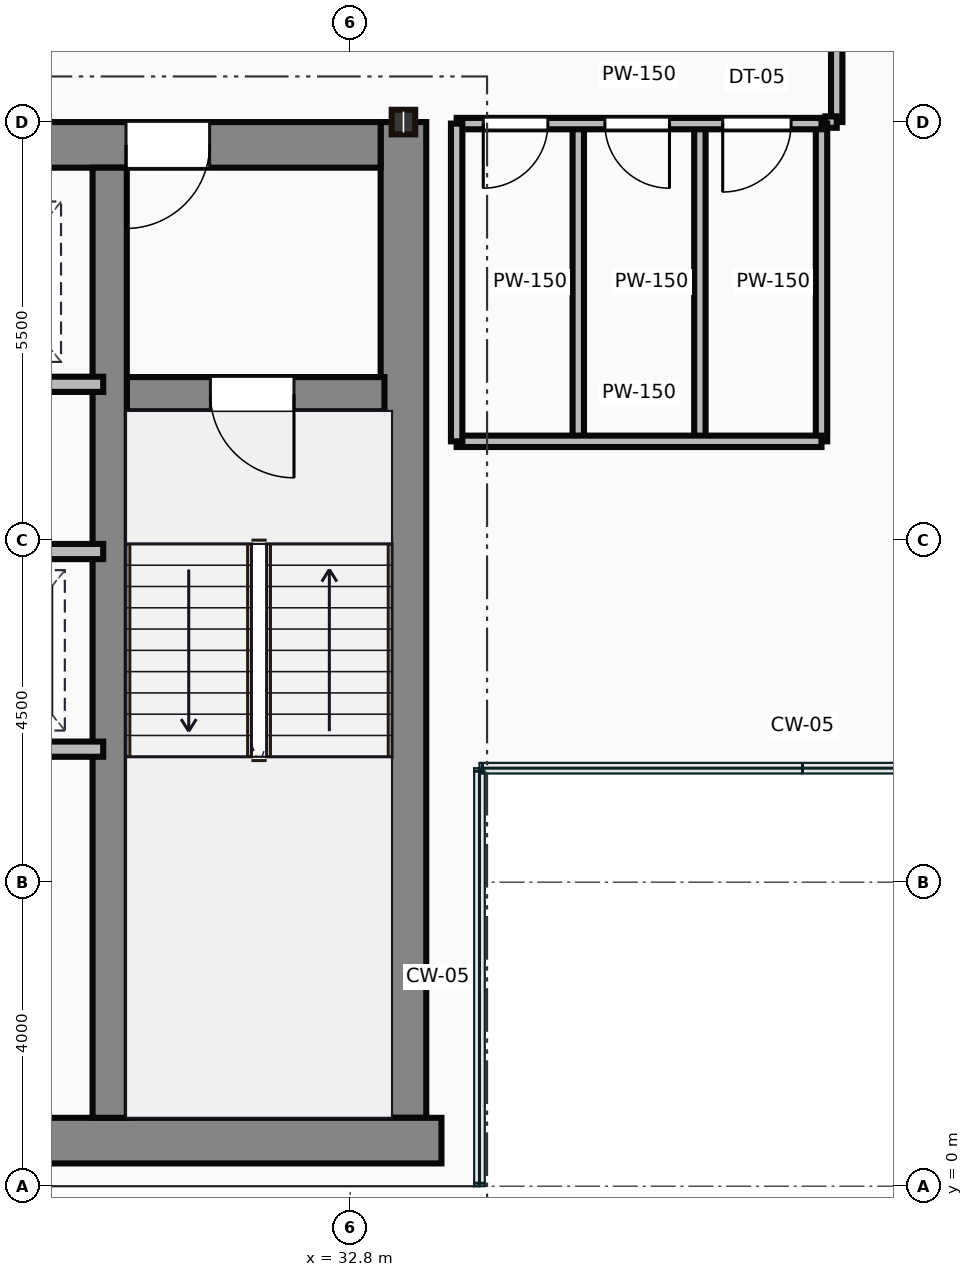
"""IFC4 building model, lengths in metres.
Left out: names, types, materials, properties, quantities, classifications, styles, units other than length and angle.
Written with IfcOpenShell. Run it as: python <this file> out.ifc"""

import sys

from ifc_helpers import new_model, si_unit, direction, frame, frame_2d, origin, origin_2d, place, context, subcontext, project, spatial, rectangle, i_section, extrude, source, transform, mapped, element, fill, save


model = new_model("IFC4")
c1 = context("Model", 3, precision=1e-05, world=origin(), true_north=direction((0.0, 1.0)))
c2 = subcontext(c1, "Body", "Model", "MODEL_VIEW")
j1 = project(units=[si_unit("LENGTHUNIT", "METRE"), si_unit("PLANEANGLEUNIT", "RADIAN")], contexts=[c1])
p1 = place(None, origin())
s1 = spatial("IfcSite", under=j1, at=p1, CompositionType="ELEMENT")
p2 = place(p1, origin())
s2 = spatial("IfcBuilding", under=s1, at=p2, CompositionType="ELEMENT")
p3 = place(p2, frame((0.0, 0.0, 221.45)))
s3 = spatial("IfcBuildingStorey", under=s2, at=p3, CompositionType="ELEMENT", Elevation=221.45)
m1 = source(origin(), c2, "Body", "SweptSolid", [
    extrude(rectangle(XDim=29.5, YDim=0.6, at=frame_2d((14.75, 0.0))), origin(), (0.0, 0.0, 1.0), 3.65),
])
p4 = place(p3, frame((4.5, 0.6, 0.0), z_axis=(0.0, 0.0, 1.0), x_axis=(1.0, 0.0, 0.0)))
e1 = element("IfcWall", 1, at=p4, inside=s3, PredefinedType="SHEAR", context=c2, shape_type="MappedRepresentation", body=[
    mapped(m1, transform((0.0, 0.0, 0.0))),
])
m2 = source(origin(), c2, "Body", "SweptSolid", [
    extrude(rectangle(XDim=13.1, YDim=0.6, at=frame_2d((6.55, 0.0))), origin(), (0.0, 0.0, 1.0), 3.65),
])
p5 = place(p3, frame((33.5, 0.9, 0.0), z_axis=(0.0, 0.0, 1.0), x_axis=(0.0, 1.0, 0.0)))
e2 = element("IfcWall", 2, at=p5, inside=s3, PredefinedType="SHEAR", context=c2, shape_type="MappedRepresentation", body=[
    mapped(m2, transform((0.0, 0.0, 0.0))),
])
m3 = source(origin(), c2, "Body", "SweptSolid", [
    extrude(rectangle(XDim=12.6, YDim=0.6, at=frame_2d((6.3, 0.0))), origin(), (0.0, 0.0, 1.0), 3.65),
])
p6 = place(p3, frame((20.6, 13.7, 0.0), z_axis=(0.0, 0.0, 1.0), x_axis=(1.0, 0.0, 0.0)))
e3 = element("IfcWall", 3, at=p6, inside=s3, PredefinedType="SHEAR", context=c2, shape_type="MappedRepresentation", body=[
    mapped(m3, transform((0.0, 0.0, 0.0))),
])
p7 = place(p6, frame((9.25, 0.0, 0.0)))
e4 = element("IfcOpeningElement", 4, at=p7, cuts=e3, PredefinedType="OPENING", context=c2, shape_type="SweptSolid", body=[
    extrude(rectangle(XDim=1.1, YDim=2.15, at=frame_2d((0.55, 1.075))), frame((0.0, 0.31, 0.0), z_axis=(0.0, -1.0, 0.0), x_axis=(1.0, 0.0, 0.0)), (0.0, 0.0, 1.0), 0.62),
])
m4 = source(origin(), c2, "Body", "SweptSolid", [
    extrude(rectangle(XDim=12.5, YDim=0.45, at=frame_2d((6.25, 0.0))), origin(), (0.0, 0.0, 1.0), 3.65),
])
p8 = place(p3, frame((29.635, 0.9, 0.0), z_axis=(0.0, 0.0, 1.0), x_axis=(0.0, 1.0, 0.0)))
e5 = element("IfcWall", 5, at=p8, inside=s3, PredefinedType="SHEAR", context=c2, shape_type="MappedRepresentation", body=[
    mapped(m4, transform((0.0, 0.0, 0.0))),
])
m5 = source(origin(), c2, "Body", "SweptSolid", [
    extrude(rectangle(XDim=3.39, YDim=0.45, at=frame_2d((1.695, 0.0))), origin(), (0.0, 0.0, 1.0), 3.65),
])
p9 = place(p3, frame((29.86, 10.42, 0.0), z_axis=(0.0, 0.0, 1.0), x_axis=(1.0, 0.0, 0.0)))
e6 = element("IfcWall", 6, at=p9, inside=s3, PredefinedType="SHEAR", context=c2, shape_type="MappedRepresentation", body=[
    mapped(m5, transform((0.0, 0.0, 0.0))),
])
p10 = place(p9, frame((1.1, 0.0, 0.0)))
e7 = element("IfcOpeningElement", 7, at=p10, cuts=e6, PredefinedType="OPENING", context=c2, shape_type="SweptSolid", body=[
    extrude(rectangle(XDim=1.1, YDim=2.15, at=frame_2d((0.55, 1.075))), frame((0.0, 0.235, 0.0), z_axis=(0.0, -1.0, 0.0), x_axis=(1.0, 0.0, 0.0)), (0.0, 0.0, 1.0), 0.47),
])
m6 = source(origin(), c2, "Body", "SweptSolid", [
    extrude(i_section(OverallWidth=0.309, OverallDepth=0.323, WebThickness=0.014, FlangeThickness=0.023, at=origin_2d()), origin(), (0.0, 0.0, 1.0), 3.65),
])
p11 = place(p3, frame((33.5, 14.0, 0.0), z_axis=(0.0, 0.0, 1.0), x_axis=(1.0, 0.0, 0.0)))
e8 = element("IfcColumn", 8, at=p11, inside=s3, PredefinedType="COLUMN", context=c2, shape_type="MappedRepresentation", body=[
    mapped(m6, transform((0.0, 0.0, 0.0))),
])
m7 = source(origin(), c2, "Body", "SweptSolid", [
    extrude(rectangle(XDim=8.8, YDim=0.2, at=frame_2d((4.4, 0.0))), origin(), (0.0, 0.0, 1.0), 3.4),
])
p12 = place(p3, frame((20.75, 10.55, 0.0), z_axis=(0.0, 0.0, 1.0), x_axis=(1.0, 0.0, 0.0)))
e9 = element("IfcWall", 9, at=p12, inside=s3, PredefinedType="PARTITIONING", context=c2, shape_type="MappedRepresentation", body=[
    mapped(m7, transform((0.0, 0.0, 0.0))),
])
p13 = place(p12, frame((0.5, 0.0, 0.0)))
e10 = element("IfcOpeningElement", 10, at=p13, cuts=e9, PredefinedType="OPENING", context=c2, shape_type="SweptSolid", body=[
    extrude(rectangle(XDim=1.05, YDim=2.15, at=frame_2d((0.525, 1.075))), frame((0.0, 0.11, 0.0), z_axis=(0.0, -1.0, 0.0), x_axis=(1.0, 0.0, 0.0)), (0.0, 0.0, 1.0), 0.22),
])
p14 = place(p12, frame((2.6, 0.0, 0.0)))
e11 = element("IfcOpeningElement", 11, at=p14, cuts=e9, PredefinedType="OPENING", context=c2, shape_type="SweptSolid", body=[
    extrude(rectangle(XDim=1.05, YDim=2.15, at=frame_2d((0.525, 1.075))), frame((0.0, 0.11, 0.0), z_axis=(0.0, -1.0, 0.0), x_axis=(1.0, 0.0, 0.0)), (0.0, 0.0, 1.0), 0.22),
])
p15 = place(p12, frame((4.7, 0.0, 0.0)))
e12 = element("IfcOpeningElement", 12, at=p15, cuts=e9, PredefinedType="OPENING", context=c2, shape_type="SweptSolid", body=[
    extrude(rectangle(XDim=1.05, YDim=2.15, at=frame_2d((0.525, 1.075))), frame((0.0, 0.11, 0.0), z_axis=(0.0, -1.0, 0.0), x_axis=(1.0, 0.0, 0.0)), (0.0, 0.0, 1.0), 0.22),
])
p16 = place(p12, frame((6.8, 0.0, 0.0)))
e13 = element("IfcOpeningElement", 13, at=p16, cuts=e9, PredefinedType="OPENING", context=c2, shape_type="SweptSolid", body=[
    extrude(rectangle(XDim=1.05, YDim=2.15, at=frame_2d((0.525, 1.075))), frame((0.0, 0.11, 0.0), z_axis=(0.0, -1.0, 0.0), x_axis=(1.0, 0.0, 0.0)), (0.0, 0.0, 1.0), 0.22),
])
m8 = source(origin(), c2, "Body", "SweptSolid", [
    extrude(rectangle(XDim=4.55, YDim=0.2, at=frame_2d((2.275, 0.0))), origin(), (0.0, 0.0, 1.0), 3.4),
])
p17 = place(p3, frame((25.0, 8.35, 0.0), z_axis=(0.0, 0.0, 1.0), x_axis=(1.0, 0.0, 0.0)))
e14 = element("IfcWall", 14, at=p17, inside=s3, PredefinedType="PARTITIONING", context=c2, shape_type="MappedRepresentation", body=[
    mapped(m8, transform((0.0, 0.0, 0.0))),
])
p18 = place(p17, frame((0.5, 0.0, 0.0)))
e15 = element("IfcOpeningElement", 15, at=p18, cuts=e14, PredefinedType="OPENING", context=c2, shape_type="SweptSolid", body=[
    extrude(rectangle(XDim=1.05, YDim=2.15, at=frame_2d((0.525, 1.075))), frame((0.0, 0.11, 0.0), z_axis=(0.0, -1.0, 0.0), x_axis=(1.0, 0.0, 0.0)), (0.0, 0.0, 1.0), 0.22),
])
p19 = place(p17, frame((2.6, 0.0, 0.0)))
e16 = element("IfcOpeningElement", 16, at=p19, cuts=e14, PredefinedType="OPENING", context=c2, shape_type="SweptSolid", body=[
    extrude(rectangle(XDim=1.05, YDim=2.15, at=frame_2d((0.525, 1.075))), frame((0.0, 0.11, 0.0), z_axis=(0.0, -1.0, 0.0), x_axis=(1.0, 0.0, 0.0)), (0.0, 0.0, 1.0), 0.22),
])
p20 = place(p3, frame((25.0, 5.75, 0.0), z_axis=(0.0, 0.0, 1.0), x_axis=(1.0, 0.0, 0.0)))
e17 = element("IfcWall", 17, at=p20, inside=s3, PredefinedType="PARTITIONING", context=c2, shape_type="MappedRepresentation", body=[
    mapped(m8, transform((0.0, 0.0, 0.0))),
])
m9 = source(origin(), c2, "Body", "SweptSolid", [
    extrude(rectangle(XDim=4.8, YDim=0.15, at=frame_2d((2.4, 0.0))), origin(), (0.0, 0.0, 1.0), 2.787),
])
p21 = place(p3, frame((34.2, 13.98, 0.0), z_axis=(0.0, 0.0, 1.0), x_axis=(1.0, 0.0, 0.0)))
e18 = element("IfcWall", 18, at=p21, inside=s3, PredefinedType="PARTITIONING", context=c2, shape_type="MappedRepresentation", body=[
    mapped(m9, transform((0.0, 0.0, 0.0))),
])
p22 = place(p21, frame((0.35, 0.0, 0.0)))
e19 = element("IfcOpeningElement", 19, at=p22, cuts=e18, PredefinedType="OPENING", context=c2, shape_type="SweptSolid", body=[
    extrude(rectangle(XDim=0.85, YDim=2.1, at=frame_2d((0.425, 1.05))), frame((0.0, 0.085, 0.0), z_axis=(0.0, -1.0, 0.0), x_axis=(1.0, 0.0, 0.0)), (0.0, 0.0, 1.0), 0.17),
])
p23 = place(p21, frame((1.95, 0.0, 0.0)))
e20 = element("IfcOpeningElement", 20, at=p23, cuts=e18, PredefinedType="OPENING", context=c2, shape_type="SweptSolid", body=[
    extrude(rectangle(XDim=0.85, YDim=2.1, at=frame_2d((0.425, 1.05))), frame((0.0, 0.085, 0.0), z_axis=(0.0, -1.0, 0.0), x_axis=(1.0, 0.0, 0.0)), (0.0, 0.0, 1.0), 0.17),
])
p24 = place(p21, frame((3.5, 0.0, 0.0)))
e21 = element("IfcOpeningElement", 21, at=p24, cuts=e18, PredefinedType="OPENING", context=c2, shape_type="SweptSolid", body=[
    extrude(rectangle(XDim=0.9, YDim=2.1, at=frame_2d((0.45, 1.05))), frame((0.0, 0.085, 0.0), z_axis=(0.0, -1.0, 0.0), x_axis=(1.0, 0.0, 0.0)), (0.0, 0.0, 1.0), 0.17),
])
m10 = source(origin(), c2, "Body", "SweptSolid", [
    extrude(rectangle(XDim=4.8, YDim=0.15, at=frame_2d((2.4, 0.0))), origin(), (0.0, 0.0, 1.0), 3.4),
])
p25 = place(p3, frame((34.2, 9.8, 0.0), z_axis=(0.0, 0.0, 1.0), x_axis=(1.0, 0.0, 0.0)))
e22 = element("IfcWall", 22, at=p25, inside=s3, PredefinedType="PARTITIONING", context=c2, shape_type="MappedRepresentation", body=[
    mapped(m10, transform((0.0, 0.0, 0.0))),
])
m11 = source(origin(), c2, "Body", "SweptSolid", [
    extrude(rectangle(XDim=4.18, YDim=0.15, at=frame_2d((2.09, 0.0))), origin(), (0.0, 0.0, 1.0), 3.4),
])
for number, where, z_axis, x_axis in (
    (23, (39.0, 9.8, 0.0), (0.0, 0.0, 1.0), (0.0, 1.0, 0.0)),
    (24, (34.2, 9.8, 0.0), (0.0, 0.0, 1.0), (0.0, 1.0, 0.0)),
    (25, (35.8, 9.8, 0.0), (0.0, 0.0, 1.0), (0.0, 1.0, 0.0)),
    (26, (37.4, 9.8, 0.0), (0.0, 0.0, 1.0), (0.0, 1.0, 0.0)),
):
    element("IfcWall", number, at=place(p3, frame(where, z_axis=z_axis, x_axis=x_axis)), inside=s3, PredefinedType="PARTITIONING", context=c2, shape_type="MappedRepresentation", body=[
        mapped(m11, transform((0.0, 0.0, 0.0))),
    ])
m12 = source(origin(), c2, "Body", "SweptSolid", [
    extrude(rectangle(XDim=2.2, YDim=0.15, at=frame_2d((1.1, 0.0))), origin(), (0.0, 0.0, 1.0), 3.4),
])
p26 = place(p3, frame((39.2, 16.2, 0.0), z_axis=(0.0, 0.0, 1.0), x_axis=(0.0, -1.0, 0.0)))
e27 = element("IfcWall", 27, at=p26, inside=s3, PredefinedType="PARTITIONING", context=c2, shape_type="MappedRepresentation", body=[
    mapped(m12, transform((0.0, 0.0, 0.0))),
])
m13 = source(origin(), c2, "Body", "SweptSolid", [
    extrude(rectangle(XDim=0.15, YDim=0.15, at=frame_2d((0.075, 0.0))), origin(), (0.0, 0.0, 1.0), 3.4),
])
p27 = place(p3, frame((39.2, 14.0, 0.0), z_axis=(0.0, 0.0, 1.0), x_axis=(-1.0, 0.0, 0.0)))
e28 = element("IfcWall", 28, at=p27, inside=s3, PredefinedType="PARTITIONING", context=c2, shape_type="MappedRepresentation", body=[
    mapped(m13, transform((0.0, 0.0, 0.0))),
])
m14 = source(origin(), c2, "Body", "SweptSolid", [
    extrude(rectangle(XDim=1.1, YDim=2.15, at=frame_2d((0.55, 1.075))), frame((0.0, 0.025, 0.0), z_axis=(0.0, -1.0, 0.0), x_axis=(1.0, 0.0, 0.0)), (0.0, 0.0, 1.0), 0.05),
])
p28 = place(p10, frame((1.1, 0.0, 0.0), z_axis=(0.0, 0.0, 1.0), x_axis=(-1.0, 0.0, 0.0)))
e29 = element("IfcDoor", 29, at=p28, inside=s3, OperationType="SINGLE_SWING_RIGHT", PredefinedType="DOOR", context=c2, shape_type="MappedRepresentation", body=[
    mapped(m14, transform((0.0, 0.0, 0.0))),
])
fill(e7, e29)
p29 = place(p7, origin())
e30 = element("IfcDoor", 30, at=p29, inside=s3, OperationType="SINGLE_SWING_LEFT", PredefinedType="DOOR", context=c2, shape_type="MappedRepresentation", body=[
    mapped(m14, transform((0.0, 0.0, 0.0))),
])
fill(e4, e30)
m15 = source(origin(), c2, "Body", "SweptSolid", [
    extrude(rectangle(XDim=0.85, YDim=2.1, at=frame_2d((0.425, 1.05))), frame((0.0, 0.025, 0.0), z_axis=(0.0, -1.0, 0.0), x_axis=(1.0, 0.0, 0.0)), (0.0, 0.0, 1.0), 0.05),
])
p30 = place(p22, frame((0.85, 0.0, 0.0), z_axis=(0.0, 0.0, 1.0), x_axis=(-1.0, 0.0, 0.0)))
e31 = element("IfcDoor", 31, at=p30, inside=s3, OperationType="SINGLE_SWING_LEFT", PredefinedType="DOOR", context=c2, shape_type="MappedRepresentation", body=[
    mapped(m15, transform((0.0, 0.0, 0.0))),
])
fill(e19, e31)
p31 = place(p23, frame((0.85, 0.0, 0.0), z_axis=(0.0, 0.0, 1.0), x_axis=(-1.0, 0.0, 0.0)))
e32 = element("IfcDoor", 32, at=p31, inside=s3, OperationType="SINGLE_SWING_RIGHT", PredefinedType="DOOR", context=c2, shape_type="MappedRepresentation", body=[
    mapped(m15, transform((0.0, 0.0, 0.0))),
])
fill(e20, e32)
m16 = source(origin(), c2, "Body", "SweptSolid", [
    extrude(rectangle(XDim=0.9, YDim=2.1, at=frame_2d((0.45, 1.05))), frame((0.0, 0.025, 0.0), z_axis=(0.0, -1.0, 0.0), x_axis=(1.0, 0.0, 0.0)), (0.0, 0.0, 1.0), 0.05),
])
p32 = place(p24, frame((0.9, 0.0, 0.0), z_axis=(0.0, 0.0, 1.0), x_axis=(-1.0, 0.0, 0.0)))
e33 = element("IfcDoor", 33, at=p32, inside=s3, OperationType="SINGLE_SWING_LEFT", PredefinedType="DOOR", context=c2, shape_type="MappedRepresentation", body=[
    mapped(m16, transform((0.0, 0.0, 0.0))),
])
fill(e21, e33)
save(model, sys.argv[1])
